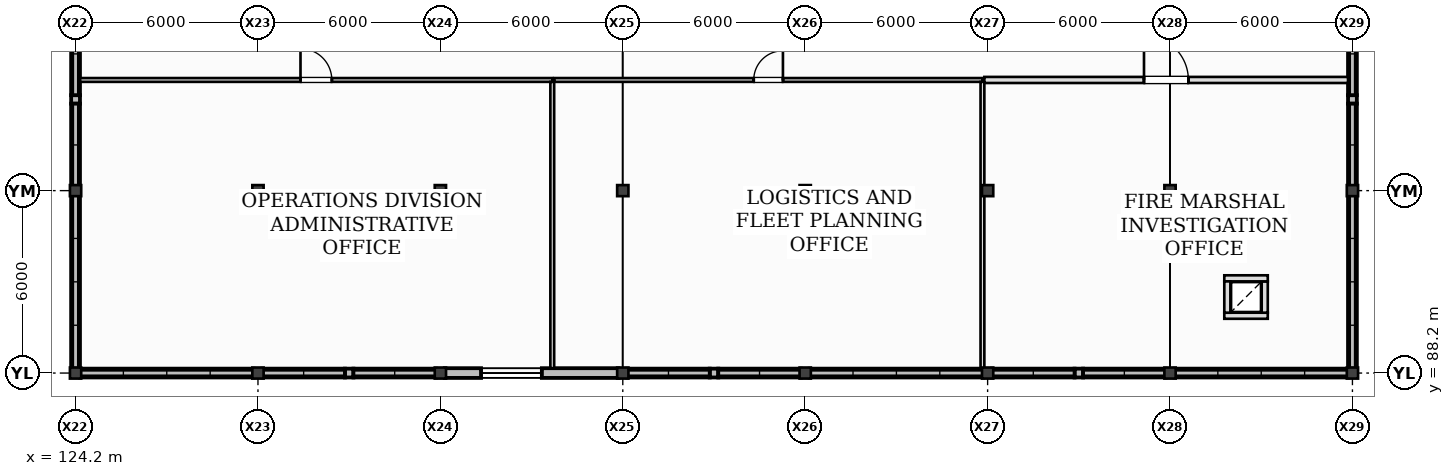
"""IFC4 building model, lengths in metres.
Left out: names, types, materials, properties, quantities, classifications, styles, units other than length and angle.
Written with IfcOpenShell. Run it as: python <this file> out.ifc"""

import sys

from ifc_helpers import new_model, si_unit, direction, frame, frame_2d, origin, origin_2d, place, context, subcontext, project, spatial, rectangle, i_section, extrude, element, fill, save


model = new_model("IFC4")
c1 = context("Model", 3, precision=1e-05, world=origin(), true_north=direction((0.0, 1.0)))
c2 = subcontext(c1, "Body", "Model", "MODEL_VIEW")
j1 = project(units=[si_unit("LENGTHUNIT", "METRE"), si_unit("PLANEANGLEUNIT", "RADIAN")], contexts=[c1])
p1 = place(None, origin())
s1 = spatial("IfcSite", under=j1, at=p1, CompositionType="ELEMENT")
p2 = place(p1, origin())
s2 = spatial("IfcBuilding", under=s1, at=p2, CompositionType="ELEMENT")
p3 = place(p2, frame((0.0, 0.0, 6.0)))
s3 = spatial("IfcBuildingStorey", under=s2, at=p3, CompositionType="ELEMENT", Elevation=6.0)
for number, where, z_axis, x_axis in (
    (1, (124.2, 88.2, 0.0), (0.0, 0.0, 1.0), (1.0, 0.0, 0.0)),
    (2, (124.2, 94.2, 0.0), (0.0, 0.0, 1.0), (1.0, 0.0, 0.0)),
    (3, (130.2, 88.2, 0.0), (0.0, 0.0, 1.0), (1.0, 0.0, 0.0)),
    (4, (130.2, 94.2, 0.0), (0.0, 0.0, 1.0), (1.0, 0.0, 0.0)),
    (5, (136.2, 88.2, 0.0), (0.0, 0.0, 1.0), (1.0, 0.0, 0.0)),
    (6, (136.2, 94.2, 0.0), (0.0, 0.0, 1.0), (1.0, 0.0, 0.0)),
    (7, (142.2, 88.2, 0.0), (0.0, 0.0, 1.0), (1.0, 0.0, 0.0)),
    (8, (142.2, 94.2, 0.0), (0.0, 0.0, 1.0), (1.0, 0.0, 0.0)),
    (9, (148.2, 88.2, 0.0), (0.0, 0.0, 1.0), (1.0, 0.0, 0.0)),
    (10, (148.2, 94.2, 0.0), (0.0, 0.0, 1.0), (1.0, 0.0, 0.0)),
    (11, (154.2, 88.2, 0.0), (0.0, 0.0, 1.0), (1.0, 0.0, 0.0)),
    (12, (154.2, 94.2, 0.0), (0.0, 0.0, 1.0), (1.0, 0.0, 0.0)),
    (13, (160.2, 88.2, 0.0), (0.0, 0.0, 1.0), (1.0, 0.0, 0.0)),
    (14, (160.2, 94.2, 0.0), (0.0, 0.0, 1.0), (1.0, 0.0, 0.0)),
    (15, (166.2, 88.2, 0.0), (0.0, 0.0, 1.0), (1.0, 0.0, 0.0)),
    (16, (166.2, 94.2, 0.0), (0.0, 0.0, 1.0), (1.0, 0.0, 0.0)),
):
    element("IfcColumn", number, at=place(p3, frame(where, z_axis=z_axis, x_axis=x_axis)), inside=s3, PredefinedType="COLUMN", context=c2, shape_type="SweptSolid", body=[
        extrude(i_section(OverallWidth=0.371, OverallDepth=0.364, WebThickness=0.013, FlangeThickness=0.022, at=origin_2d()), origin(), (0.0, 0.0, 1.0), 4.0),
    ])
p4 = place(p3, frame((124.345, 88.2, 0.0), z_axis=(0.0, 0.0, 1.0), x_axis=(1.0, 0.0, 0.0)))
e17 = element("IfcWall", 17, at=p4, inside=s3, PredefinedType="STANDARD", context=c2, shape_type="SweptSolid", body=[
    extrude(rectangle(XDim=5.71, YDim=0.29, at=frame_2d((2.855, 0.0))), origin(), (0.0, 0.0, 1.0), 0.68),
])
p5 = place(p3, frame((133.06, 88.2, 0.0), z_axis=(0.0, 0.0, 1.0), x_axis=(1.0, 0.0, 0.0)))
e18 = element("IfcWall", 18, at=p5, inside=s3, PredefinedType="STANDARD", context=c2, shape_type="SweptSolid", body=[
    extrude(rectangle(XDim=0.28, YDim=0.29, at=frame_2d((0.14, 0.0))), origin(), (0.0, 0.0, 1.0), 3.153),
])
p6 = place(p3, frame((130.345, 88.2, 0.0), z_axis=(0.0, 0.0, 1.0), x_axis=(1.0, 0.0, 0.0)))
e19 = element("IfcWall", 19, at=p6, inside=s3, PredefinedType="STANDARD", context=c2, shape_type="SweptSolid", body=[
    extrude(rectangle(XDim=2.715, YDim=0.29, at=frame_2d((1.357, 0.0))), origin(), (0.0, 0.0, 1.0), 0.8),
])
p7 = place(p3, frame((133.34, 88.2, 0.0), z_axis=(0.0, 0.0, 1.0), x_axis=(1.0, 0.0, 0.0)))
e20 = element("IfcWall", 20, at=p7, inside=s3, PredefinedType="STANDARD", context=c2, shape_type="SweptSolid", body=[
    extrude(rectangle(XDim=2.715, YDim=0.29, at=frame_2d((1.357, 0.0))), origin(), (0.0, 0.0, 1.0), 0.92),
])
p8 = place(p3, frame((136.345, 88.2, 0.0), z_axis=(0.0, 0.0, 1.0), x_axis=(1.0, 0.0, 0.0)))
e21 = element("IfcWall", 21, at=p8, inside=s3, PredefinedType="STANDARD", context=c2, shape_type="SweptSolid", body=[
    extrude(rectangle(XDim=5.71, YDim=0.32, at=frame_2d((2.855, 0.0))), origin(), (0.0, 0.0, 1.0), 3.153),
])
p9 = place(p8, frame((1.193, 0.0, 1.0)))
e22 = element("IfcOpeningElement", 22, at=p9, cuts=e21, PredefinedType="OPENING", context=c2, shape_type="SweptSolid", body=[
    extrude(rectangle(XDim=2.0, YDim=1.36, at=frame_2d((1.0, 0.68))), frame((0.0, 0.17, 0.0), z_axis=(0.0, -1.0, 0.0), x_axis=(1.0, 0.0, 0.0)), (0.0, 0.0, 1.0), 0.34),
])
p10 = place(p3, frame((145.06, 88.2, 0.0), z_axis=(0.0, 0.0, 1.0), x_axis=(1.0, 0.0, 0.0)))
e23 = element("IfcWall", 23, at=p10, inside=s3, PredefinedType="STANDARD", context=c2, shape_type="SweptSolid", body=[
    extrude(rectangle(XDim=0.28, YDim=0.29, at=frame_2d((0.14, 0.0))), origin(), (0.0, 0.0, 1.0), 3.153),
])
p11 = place(p3, frame((142.345, 88.2, 0.0), z_axis=(0.0, 0.0, 1.0), x_axis=(1.0, 0.0, 0.0)))
e24 = element("IfcWall", 24, at=p11, inside=s3, PredefinedType="STANDARD", context=c2, shape_type="SweptSolid", body=[
    extrude(rectangle(XDim=2.715, YDim=0.29, at=frame_2d((1.357, 0.0))), origin(), (0.0, 0.0, 1.0), 0.32),
])
p12 = place(p3, frame((145.34, 88.2, 0.0), z_axis=(0.0, 0.0, 1.0), x_axis=(1.0, 0.0, 0.0)))
e25 = element("IfcWall", 25, at=p12, inside=s3, PredefinedType="STANDARD", context=c2, shape_type="SweptSolid", body=[
    extrude(rectangle(XDim=2.715, YDim=0.29, at=frame_2d((1.357, 0.0))), origin(), (0.0, 0.0, 1.0), 0.44),
])
p13 = place(p3, frame((148.345, 88.2, 0.0), z_axis=(0.0, 0.0, 1.0), x_axis=(1.0, 0.0, 0.0)))
e26 = element("IfcWall", 26, at=p13, inside=s3, PredefinedType="STANDARD", context=c2, shape_type="SweptSolid", body=[
    extrude(rectangle(XDim=5.71, YDim=0.29, at=frame_2d((2.855, 0.0))), origin(), (0.0, 0.0, 1.0), 0.56),
])
p14 = place(p3, frame((157.06, 88.2, 0.0), z_axis=(0.0, 0.0, 1.0), x_axis=(1.0, 0.0, 0.0)))
e27 = element("IfcWall", 27, at=p14, inside=s3, PredefinedType="STANDARD", context=c2, shape_type="SweptSolid", body=[
    extrude(rectangle(XDim=0.28, YDim=0.29, at=frame_2d((0.14, 0.0))), origin(), (0.0, 0.0, 1.0), 3.153),
])
p15 = place(p3, frame((154.345, 88.2, 0.0), z_axis=(0.0, 0.0, 1.0), x_axis=(1.0, 0.0, 0.0)))
e28 = element("IfcWall", 28, at=p15, inside=s3, PredefinedType="STANDARD", context=c2, shape_type="SweptSolid", body=[
    extrude(rectangle(XDim=2.715, YDim=0.29, at=frame_2d((1.357, 0.0))), origin(), (0.0, 0.0, 1.0), 0.68),
])
p16 = place(p3, frame((157.34, 88.2, 0.0), z_axis=(0.0, 0.0, 1.0), x_axis=(1.0, 0.0, 0.0)))
e29 = element("IfcWall", 29, at=p16, inside=s3, PredefinedType="STANDARD", context=c2, shape_type="SweptSolid", body=[
    extrude(rectangle(XDim=2.715, YDim=0.29, at=frame_2d((1.357, 0.0))), origin(), (0.0, 0.0, 1.0), 0.8),
])
p17 = place(p3, frame((160.345, 88.2, 0.0), z_axis=(0.0, 0.0, 1.0), x_axis=(1.0, 0.0, 0.0)))
e30 = element("IfcWall", 30, at=p17, inside=s3, PredefinedType="STANDARD", context=c2, shape_type="SweptSolid", body=[
    extrude(rectangle(XDim=5.71, YDim=0.29, at=frame_2d((2.855, 0.0))), origin(), (0.0, 0.0, 1.0), 0.92),
])
p18 = place(p3, frame((124.2, 94.055, 0.0), z_axis=(0.0, 0.0, 1.0), x_axis=(0.0, -1.0, 0.0)))
e31 = element("IfcWall", 31, at=p18, inside=s3, PredefinedType="STANDARD", context=c2, shape_type="SweptSolid", body=[
    extrude(rectangle(XDim=5.71, YDim=0.29, at=frame_2d((2.855, 0.0))), origin(), (0.0, 0.0, 1.0), 0.56),
])
p19 = place(p3, frame((124.2, 97.34, 0.0), z_axis=(0.0, 0.0, 1.0), x_axis=(0.0, -1.0, 0.0)))
e32 = element("IfcWall", 32, at=p19, inside=s3, PredefinedType="STANDARD", context=c2, shape_type="SweptSolid", body=[
    extrude(rectangle(XDim=0.28, YDim=0.29, at=frame_2d((0.14, 0.0))), origin(), (0.0, 0.0, 1.0), 3.157),
])
p20 = place(p3, frame((124.2, 100.055, 0.0), z_axis=(0.0, 0.0, 1.0), x_axis=(0.0, -1.0, 0.0)))
e33 = element("IfcWall", 33, at=p20, inside=s3, PredefinedType="STANDARD", context=c2, shape_type="SweptSolid", body=[
    extrude(rectangle(XDim=2.715, YDim=0.29, at=frame_2d((1.357, 0.0))), origin(), (0.0, 0.0, 1.0), 0.68),
])
p21 = place(p3, frame((124.2, 97.06, 0.0), z_axis=(0.0, 0.0, 1.0), x_axis=(0.0, -1.0, 0.0)))
e34 = element("IfcWall", 34, at=p21, inside=s3, PredefinedType="STANDARD", context=c2, shape_type="SweptSolid", body=[
    extrude(rectangle(XDim=2.715, YDim=0.29, at=frame_2d((1.357, 0.0))), origin(), (0.0, 0.0, 1.0), 0.8),
])
p22 = place(p3, frame((166.2, 88.345, 0.0), z_axis=(0.0, 0.0, 1.0), x_axis=(0.0, 1.0, 0.0)))
e35 = element("IfcWall", 35, at=p22, inside=s3, PredefinedType="STANDARD", context=c2, shape_type="SweptSolid", body=[
    extrude(rectangle(XDim=5.71, YDim=0.29, at=frame_2d((2.855, 0.0))), origin(), (0.0, 0.0, 1.0), 0.32),
])
p23 = place(p3, frame((166.2, 97.06, 0.0), z_axis=(0.0, 0.0, 1.0), x_axis=(0.0, 1.0, 0.0)))
e36 = element("IfcWall", 36, at=p23, inside=s3, PredefinedType="STANDARD", context=c2, shape_type="SweptSolid", body=[
    extrude(rectangle(XDim=0.28, YDim=0.29, at=frame_2d((0.14, 0.0))), origin(), (0.0, 0.0, 1.0), 3.227),
])
p24 = place(p3, frame((166.2, 94.345, 0.0), z_axis=(0.0, 0.0, 1.0), x_axis=(0.0, 1.0, 0.0)))
e37 = element("IfcWall", 37, at=p24, inside=s3, PredefinedType="STANDARD", context=c2, shape_type="SweptSolid", body=[
    extrude(rectangle(XDim=2.715, YDim=0.29, at=frame_2d((1.357, 0.0))), origin(), (0.0, 0.0, 1.0), 0.44),
])
p25 = place(p3, frame((166.2, 97.34, 0.0), z_axis=(0.0, 0.0, 1.0), x_axis=(0.0, 1.0, 0.0)))
e38 = element("IfcWall", 38, at=p25, inside=s3, PredefinedType="STANDARD", context=c2, shape_type="SweptSolid", body=[
    extrude(rectangle(XDim=2.715, YDim=0.29, at=frame_2d((1.357, 0.0))), origin(), (0.0, 0.0, 1.0), 0.56),
])
p26 = place(p3, frame((161.985, 90.085, 0.0), z_axis=(0.0, 0.0, 1.0), x_axis=(1.0, 0.0, 0.0)))
e39 = element("IfcWall", 39, at=p26, inside=s3, PredefinedType="PARTITIONING", context=c2, shape_type="SweptSolid", body=[
    extrude(rectangle(XDim=1.43, YDim=0.2, at=frame_2d((0.715, 0.0))), origin(), (0.0, 0.0, 1.0), 3.72),
])
p27 = place(p3, frame((163.315, 90.185, 0.0), z_axis=(0.0, 0.0, 1.0), x_axis=(0.0, 1.0, 0.0)))
e40 = element("IfcWall", 40, at=p27, inside=s3, PredefinedType="PARTITIONING", context=c2, shape_type="SweptSolid", body=[
    extrude(rectangle(XDim=1.03, YDim=0.2, at=frame_2d((0.515, 0.0))), origin(), (0.0, 0.0, 1.0), 3.72),
])
p28 = place(p3, frame((163.415, 91.315, 0.0), z_axis=(0.0, 0.0, 1.0), x_axis=(-1.0, 0.0, 0.0)))
e41 = element("IfcWall", 41, at=p28, inside=s3, PredefinedType="PARTITIONING", context=c2, shape_type="SweptSolid", body=[
    extrude(rectangle(XDim=1.43, YDim=0.2, at=frame_2d((0.715, 0.0))), origin(), (0.0, 0.0, 1.0), 3.72),
])
p29 = place(p3, frame((162.085, 91.215, 0.0), z_axis=(0.0, 0.0, 1.0), x_axis=(0.0, -1.0, 0.0)))
e42 = element("IfcWall", 42, at=p29, inside=s3, PredefinedType="PARTITIONING", context=c2, shape_type="SweptSolid", body=[
    extrude(rectangle(XDim=1.03, YDim=0.2, at=frame_2d((0.515, 0.0))), origin(), (0.0, 0.0, 1.0), 3.5),
])
p30 = place(p3, frame((124.345, 97.84, 0.0), z_axis=(0.0, 0.0, 1.0), x_axis=(1.0, 0.0, 0.0)))
e43 = element("IfcWall", 43, at=p30, inside=s3, PredefinedType="PARTITIONING", context=c2, shape_type="SweptSolid", body=[
    extrude(rectangle(XDim=15.538, YDim=0.125, at=frame_2d((7.769, 0.0))), origin(), (0.0, 0.0, 1.0), 3.72),
])
p31 = place(p30, frame((7.254, 0.0, 0.0)))
e44 = element("IfcOpeningElement", 44, at=p31, cuts=e43, PredefinedType="OPENING", context=c2, shape_type="SweptSolid", body=[
    extrude(rectangle(XDim=1.03, YDim=2.15, at=frame_2d((0.515, 1.075))), frame((0.0, 0.073, 0.0), z_axis=(0.0, -1.0, 0.0), x_axis=(1.0, 0.0, 0.0)), (0.0, 0.0, 1.0), 0.145),
])
p32 = place(p3, frame((139.88, 97.778, 0.0), z_axis=(0.0, 0.0, 1.0), x_axis=(0.0, -1.0, 0.0)))
e45 = element("IfcWall", 45, at=p32, inside=s3, PredefinedType="PARTITIONING", context=c2, shape_type="SweptSolid", body=[
    extrude(rectangle(XDim=9.417, YDim=0.125, at=frame_2d((4.709, 0.0))), origin(), (0.0, 0.0, 1.0), 3.289),
])
p33 = place(p3, frame((139.942, 97.84, 0.0), z_axis=(0.0, 0.0, 1.0), x_axis=(1.0, 0.0, 0.0)))
e46 = element("IfcWall", 46, at=p33, inside=s3, PredefinedType="PARTITIONING", context=c2, shape_type="SweptSolid", body=[
    extrude(rectangle(XDim=14.09, YDim=0.125, at=frame_2d((7.045, 0.0))), origin(), (0.0, 0.0, 1.0), 3.72),
])
p34 = place(p33, frame((6.565, 0.0, 0.0)))
e47 = element("IfcOpeningElement", 47, at=p34, cuts=e46, PredefinedType="OPENING", context=c2, shape_type="SweptSolid", body=[
    extrude(rectangle(XDim=0.96, YDim=2.15, at=frame_2d((0.48, 1.075))), frame((0.0, 0.073, 0.0), z_axis=(0.0, -1.0, 0.0), x_axis=(1.0, 0.0, 0.0)), (0.0, 0.0, 1.0), 0.145),
])
p35 = place(p3, frame((154.03, 97.778, 0.0), z_axis=(0.0, 0.0, 1.0), x_axis=(0.0, -1.0, 0.0)))
e48 = element("IfcWall", 48, at=p35, inside=s3, PredefinedType="PARTITIONING", context=c2, shape_type="SweptSolid", body=[
    extrude(rectangle(XDim=9.433, YDim=0.125, at=frame_2d((4.716, 0.0))), origin(), (0.0, 0.0, 1.0), 3.157),
])
p36 = place(p3, frame((154.093, 97.84, 0.0), z_axis=(0.0, 0.0, 1.0), x_axis=(1.0, 0.0, 0.0)))
e49 = element("IfcWall", 49, at=p36, inside=s3, PredefinedType="PARTITIONING", context=c2, shape_type="SweptSolid", body=[
    extrude(rectangle(XDim=11.962, YDim=0.2, at=frame_2d((5.981, 0.0))), origin(), (0.0, 0.0, 1.0), 3.72),
])
p37 = place(p36, frame((5.251, 0.0, 0.0)))
e50 = element("IfcOpeningElement", 50, at=p37, cuts=e49, PredefinedType="OPENING", context=c2, shape_type="SweptSolid", body=[
    extrude(rectangle(XDim=1.46, YDim=2.3, at=frame_2d((0.73, 1.15))), frame((0.0, 0.11, 0.0), z_axis=(0.0, -1.0, 0.0), x_axis=(1.0, 0.0, 0.0)), (0.0, 0.0, 1.0), 0.22),
])
p38 = place(p9, origin())
e51 = element("IfcWindow", 51, at=p38, inside=s3, PartitioningType="SINGLE_PANEL", PredefinedType="WINDOW", context=c2, shape_type="SweptSolid", body=[
    extrude(rectangle(XDim=2.0, YDim=1.36, at=frame_2d((1.0, 0.68))), frame((0.0, 0.03, 0.0), z_axis=(0.0, -1.0, 0.0), x_axis=(1.0, 0.0, 0.0)), (0.0, 0.0, 1.0), 0.06),
])
fill(e22, e51)
p39 = place(p31, frame((1.03, 0.0, 0.0), z_axis=(0.0, 0.0, 1.0), x_axis=(-1.0, 0.0, 0.0)))
e52 = element("IfcDoor", 52, at=p39, inside=s3, OperationType="SINGLE_SWING_LEFT", PredefinedType="DOOR", context=c2, shape_type="SweptSolid", body=[
    extrude(rectangle(XDim=1.03, YDim=2.15, at=frame_2d((0.515, 1.075))), frame((0.0, 0.025, 0.0), z_axis=(0.0, -1.0, 0.0), x_axis=(1.0, 0.0, 0.0)), (0.0, 0.0, 1.0), 0.05),
])
fill(e44, e52)
p40 = place(p34, frame((0.96, 0.0, 0.0), z_axis=(0.0, 0.0, 1.0), x_axis=(-1.0, 0.0, 0.0)))
e53 = element("IfcDoor", 53, at=p40, inside=s3, OperationType="SINGLE_SWING_RIGHT", PredefinedType="DOOR", context=c2, shape_type="SweptSolid", body=[
    extrude(rectangle(XDim=0.96, YDim=2.15, at=frame_2d((0.48, 1.075))), frame((0.0, 0.025, 0.0), z_axis=(0.0, -1.0, 0.0), x_axis=(1.0, 0.0, 0.0)), (0.0, 0.0, 1.0), 0.05),
])
fill(e47, e53)
p41 = place(p37, frame((1.46, 0.0, 0.0), z_axis=(0.0, 0.0, 1.0), x_axis=(-1.0, 0.0, 0.0)))
e54 = element("IfcDoor", 54, at=p41, inside=s3, OperationType="SINGLE_SWING_LEFT", PredefinedType="DOOR", context=c2, shape_type="SweptSolid", body=[
    extrude(rectangle(XDim=1.46, YDim=2.3, at=frame_2d((0.73, 1.15))), frame((0.0, 0.025, 0.0), z_axis=(0.0, -1.0, 0.0), x_axis=(1.0, 0.0, 0.0)), (0.0, 0.0, 1.0), 0.05),
])
fill(e50, e54)
save(model, sys.argv[1])
